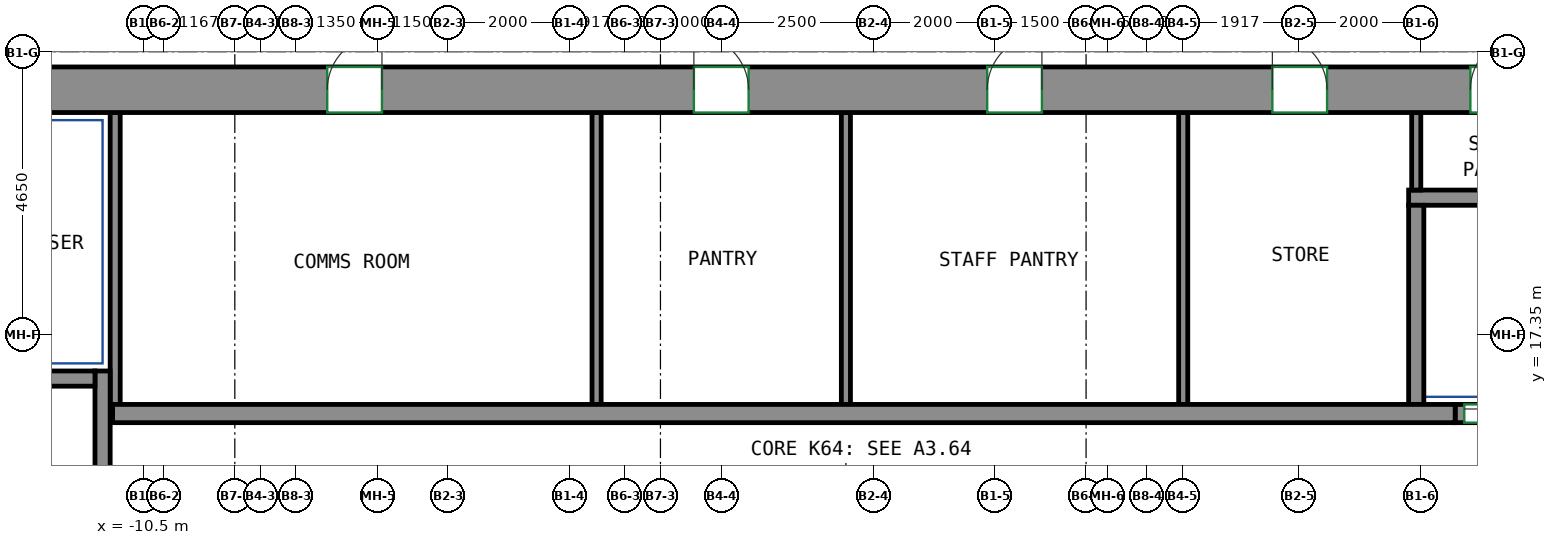
"""IFC4 building model, lengths in metres.
Left out: names, types, materials, properties, quantities, classifications, styles, units other than length and angle.
Written with IfcOpenShell. Run it as: python <this file> out.ifc"""

import sys

from ifc_helpers import new_model, si_unit, direction, frame, frame_2d, origin, place, context, subcontext, project, spatial, rectangle, extrude, source, transform, mapped, element, fill, save


model = new_model("IFC4")
c1 = context("Model", 3, precision=1e-05, world=origin(), true_north=direction((0.0, 1.0)))
c2 = subcontext(c1, "Body", "Model", "MODEL_VIEW")
j1 = project(units=[si_unit("LENGTHUNIT", "METRE"), si_unit("PLANEANGLEUNIT", "RADIAN")], contexts=[c1])
p1 = place(None, origin())
s1 = spatial("IfcSite", under=j1, at=p1, CompositionType="ELEMENT")
p2 = place(p1, origin())
s2 = spatial("IfcBuilding", under=s1, at=p2, CompositionType="ELEMENT")
p3 = place(p2, frame((0.0, 0.0, 259.4)))
s3 = spatial("IfcBuildingStorey", under=s2, at=p3, CompositionType="ELEMENT", Elevation=259.4)
m1 = source(origin(), c2, "Body", "SweptSolid", [
    extrude(rectangle(XDim=33.6, YDim=0.75, at=frame_2d((16.8, 0.0))), origin(), (0.0, 0.0, 1.0), 3.0),
])
p4 = place(p3, frame((-15.75, 21.375, 0.0), z_axis=(0.0, 0.0, 1.0), x_axis=(1.0, 0.0, 0.0)))
e1 = element("IfcWall", 1, at=p4, inside=s3, PredefinedType="SHEAR", context=c2, shape_type="MappedRepresentation", body=[
    mapped(m1, transform((0.0, 0.0, 0.0))),
])
p5 = place(p4, frame((8.27, 0.0, 0.0)))
e2 = element("IfcOpeningElement", 2, at=p5, cuts=e1, PredefinedType="OPENING", context=c2, shape_type="SweptSolid", body=[
    extrude(rectangle(XDim=0.9, YDim=2.1, at=frame_2d((0.45, 1.05))), frame((0.0, 0.385, 0.0), z_axis=(0.0, -1.0, 0.0), x_axis=(1.0, 0.0, 0.0)), (0.0, 0.0, 1.0), 0.77),
])
p6 = place(p4, frame((14.3, 0.0, 0.0)))
e3 = element("IfcOpeningElement", 3, at=p6, cuts=e1, PredefinedType="OPENING", context=c2, shape_type="SweptSolid", body=[
    extrude(rectangle(XDim=0.9, YDim=2.1, at=frame_2d((0.45, 1.05))), frame((0.0, 0.385, 0.0), z_axis=(0.0, -1.0, 0.0), x_axis=(1.0, 0.0, 0.0)), (0.0, 0.0, 1.0), 0.77),
])
p7 = place(p4, frame((19.124, 0.0, 0.0)))
e4 = element("IfcOpeningElement", 4, at=p7, cuts=e1, PredefinedType="OPENING", context=c2, shape_type="SweptSolid", body=[
    extrude(rectangle(XDim=0.9, YDim=2.1, at=frame_2d((0.45, 1.05))), frame((0.0, 0.385, 0.0), z_axis=(0.0, -1.0, 0.0), x_axis=(1.0, 0.0, 0.0)), (0.0, 0.0, 1.0), 0.77),
])
p8 = place(p4, frame((23.814, 0.0, 0.0)))
e5 = element("IfcOpeningElement", 5, at=p8, cuts=e1, PredefinedType="OPENING", context=c2, shape_type="SweptSolid", body=[
    extrude(rectangle(XDim=0.9, YDim=2.1, at=frame_2d((0.45, 1.05))), frame((0.0, 0.385, 0.0), z_axis=(0.0, -1.0, 0.0), x_axis=(1.0, 0.0, 0.0)), (0.0, 0.0, 1.0), 0.77),
])
p9 = place(p4, frame((27.07, 0.0, 0.0)))
e6 = element("IfcOpeningElement", 6, at=p9, cuts=e1, PredefinedType="OPENING", context=c2, shape_type="SweptSolid", body=[
    extrude(rectangle(XDim=0.9, YDim=2.1, at=frame_2d((0.45, 1.05))), frame((0.0, 0.385, 0.0), z_axis=(0.0, -1.0, 0.0), x_axis=(1.0, 0.0, 0.0)), (0.0, 0.0, 1.0), 0.77),
])
p10 = place(p4, frame((2.275, 0.0, 0.0)))
e7 = element("IfcOpeningElement", 7, at=p10, cuts=e1, PredefinedType="OPENING", context=c2, shape_type="SweptSolid", body=[
    extrude(rectangle(XDim=0.9, YDim=2.1, at=frame_2d((0.45, 1.05))), frame((0.0, 0.385, 0.0), z_axis=(0.0, -1.0, 0.0), x_axis=(1.0, 0.0, 0.0)), (0.0, 0.0, 1.0), 0.77),
])
p11 = place(p4, frame((30.425, 0.0, 0.0)))
e8 = element("IfcOpeningElement", 8, at=p11, cuts=e1, PredefinedType="OPENING", context=c2, shape_type="SweptSolid", body=[
    extrude(rectangle(XDim=0.9, YDim=2.1, at=frame_2d((0.45, 1.05))), frame((0.0, 0.385, 0.0), z_axis=(0.0, -1.0, 0.0), x_axis=(1.0, 0.0, 0.0)), (0.0, 0.0, 1.0), 0.77),
])
m2 = source(origin(), c2, "Body", "SweptSolid", [
    extrude(rectangle(XDim=7.75, YDim=0.25, at=frame_2d((3.875, 0.0))), origin(), (0.0, 0.0, 1.0), 3.0),
])
p12 = place(p3, frame((-11.175, 9.0, 0.0), z_axis=(0.0, 0.0, 1.0), x_axis=(0.0, 1.0, 0.0)))
e9 = element("IfcWall", 9, at=p12, inside=s3, PredefinedType="SHEAR", context=c2, shape_type="MappedRepresentation", body=[
    mapped(m2, transform((0.0, 0.0, 0.0))),
])
m3 = source(origin(), c2, "Body", "SweptSolid", [
    extrude(rectangle(XDim=3.7, YDim=0.25, at=frame_2d((1.85, 0.0))), origin(), (0.0, 0.0, 1.0), 3.0),
])
p13 = place(p3, frame((-15.0, 16.625, 0.0), z_axis=(0.0, 0.0, 1.0), x_axis=(1.0, 0.0, 0.0)))
e10 = element("IfcWall", 10, at=p13, inside=s3, PredefinedType="SHEAR", context=c2, shape_type="MappedRepresentation", body=[
    mapped(m3, transform((0.0, 0.0, 0.0))),
])
m4 = source(origin(), c2, "Body", "SweptSolid", [
    extrude(rectangle(XDim=22.08, YDim=0.3, at=frame_2d((11.04, 0.0))), origin(), (0.0, 0.0, 1.0), 3.0),
])
p14 = place(p3, frame((-11.01, 16.05, 0.0), z_axis=(0.0, 0.0, 1.0), x_axis=(1.0, 0.0, 0.0)))
e11 = element("IfcWall", 11, at=p14, inside=s3, PredefinedType="SHEAR", context=c2, shape_type="MappedRepresentation", body=[
    mapped(m4, transform((0.0, 0.0, 0.0))),
])
m5 = source(origin(), c2, "Body", "SweptSolid", [
    extrude(rectangle(XDim=1.4, YDim=0.3, at=frame_2d((0.7, 0.0))), origin(), (0.0, 0.0, 1.0), 3.0),
])
p15 = place(p3, frame((11.07, 16.05, 0.0), z_axis=(0.0, 0.0, 1.0), x_axis=(1.0, 0.0, 0.0)))
e12 = element("IfcWall", 12, at=p15, inside=s3, PredefinedType="PARTITIONING", context=c2, shape_type="MappedRepresentation", body=[
    mapped(m5, transform((0.0, 0.0, 0.0))),
])
p16 = place(p15, frame((0.15, 0.0, 0.0)))
e13 = element("IfcOpeningElement", 13, at=p16, cuts=e12, PredefinedType="OPENING", context=c2, shape_type="SweptSolid", body=[
    extrude(rectangle(XDim=1.1, YDim=2.1, at=frame_2d((0.55, 1.05))), frame((0.0, 0.16, 0.0), z_axis=(0.0, -1.0, 0.0), x_axis=(1.0, 0.0, 0.0)), (0.0, 0.0, 1.0), 0.32),
])
m6 = source(origin(), c2, "Body", "SweptSolid", [
    extrude(rectangle(XDim=2.93, YDim=0.25, at=frame_2d((1.465, 0.0))), origin(), (0.0, 0.0, 1.0), 3.0),
])
p17 = place(p3, frame((10.305, 19.6, 0.0), z_axis=(0.0, 0.0, 1.0), x_axis=(1.0, 0.0, 0.0)))
e14 = element("IfcWall", 14, at=p17, inside=s3, PredefinedType="PARTITIONING", context=c2, shape_type="MappedRepresentation", body=[
    mapped(m6, transform((0.0, 0.0, 0.0))),
])
m7 = source(origin(), c2, "Body", "SweptSolid", [
    extrude(rectangle(XDim=4.8, YDim=0.165, at=frame_2d((2.4, 0.0))), origin(), (0.0, 0.0, 1.0), 3.0),
])
p18 = place(p3, frame((-10.968, 16.2, 0.0), z_axis=(0.0, 0.0, 1.0), x_axis=(0.0, 1.0, 0.0)))
e15 = element("IfcWall", 15, at=p18, inside=s3, PredefinedType="PARTITIONING", context=c2, shape_type="MappedRepresentation", body=[
    mapped(m7, transform((0.0, 0.0, 0.0))),
])
m8 = source(origin(), c2, "Body", "SweptSolid", [
    extrude(rectangle(XDim=3.275, YDim=0.25, at=frame_2d((1.638, 0.0))), origin(), (0.0, 0.0, 1.0), 3.0),
])
p19 = place(p3, frame((10.43, 16.2, 0.0), z_axis=(0.0, 0.0, 1.0), x_axis=(0.0, 1.0, 0.0)))
e16 = element("IfcWall", 16, at=p19, inside=s3, PredefinedType="PARTITIONING", context=c2, shape_type="MappedRepresentation", body=[
    mapped(m8, transform((0.0, 0.0, 0.0))),
])
m9 = source(origin(), c2, "Body", "SweptSolid", [
    extrude(rectangle(XDim=4.8, YDim=0.15, at=frame_2d((2.4, 0.0))), origin(), (0.0, 0.0, 1.0), 3.0),
])
for number, where, z_axis, x_axis in (
    (17, (-3.05, 16.2, 0.0), (0.0, 0.0, 1.0), (0.0, 1.0, 0.0)),
    (18, (1.05, 16.2, 0.0), (0.0, 0.0, 1.0), (0.0, 1.0, 0.0)),
    (19, (6.598, 16.2, 0.0), (0.0, 0.0, 1.0), (0.0, 1.0, 0.0)),
):
    element("IfcWall", number, at=place(p3, frame(where, z_axis=z_axis, x_axis=x_axis)), inside=s3, PredefinedType="PARTITIONING", context=c2, shape_type="MappedRepresentation", body=[
        mapped(m9, transform((0.0, 0.0, 0.0))),
    ])
m10 = source(origin(), c2, "Body", "SweptSolid", [
    extrude(rectangle(XDim=1.275, YDim=0.15, at=frame_2d((0.637, 0.0))), origin(), (0.0, 0.0, 1.0), 3.0),
])
p20 = place(p3, frame((10.43, 19.725, 0.0), z_axis=(0.0, 0.0, 1.0), x_axis=(0.0, 1.0, 0.0)))
e20 = element("IfcWall", 20, at=p20, inside=s3, PredefinedType="PARTITIONING", context=c2, shape_type="MappedRepresentation", body=[
    mapped(m10, transform((0.0, 0.0, 0.0))),
])
p21 = place(p16, origin())
e21 = element("IfcDoor", 21, at=p21, inside=s3, OperationType="DOUBLE_DOOR_SLIDING", PredefinedType="DOOR", context=c2, shape_type="SweptSolid", body=[
    extrude(rectangle(XDim=1.1, YDim=2.1, at=frame_2d((0.55, 1.05))), frame((0.0, 0.025, 0.0), z_axis=(0.0, -1.0, 0.0), x_axis=(1.0, 0.0, 0.0)), (0.0, 0.0, 1.0), 0.05),
])
fill(e13, e21)
p22 = place(p5, origin())
e22 = element("IfcDoor", 22, at=p22, inside=s3, OperationType="SINGLE_SWING_RIGHT", PredefinedType="DOOR", context=c2, shape_type="SweptSolid", body=[
    extrude(rectangle(XDim=0.9, YDim=2.1, at=frame_2d((0.45, 1.05))), frame((0.0, -0.23, 0.0), z_axis=(0.0, -1.0, 0.0), x_axis=(1.0, 0.0, 0.0)), (0.0, 0.0, 1.0), 0.05),
])
fill(e2, e22)
p23 = place(p6, origin())
e23 = element("IfcDoor", 23, at=p23, inside=s3, OperationType="SINGLE_SWING_LEFT", PredefinedType="DOOR", context=c2, shape_type="SweptSolid", body=[
    extrude(rectangle(XDim=0.9, YDim=2.1, at=frame_2d((0.45, 1.05))), frame((0.0, -0.23, 0.0), z_axis=(0.0, -1.0, 0.0), x_axis=(1.0, 0.0, 0.0)), (0.0, 0.0, 1.0), 0.05),
])
fill(e3, e23)
p24 = place(p7, origin())
e24 = element("IfcDoor", 24, at=p24, inside=s3, OperationType="SINGLE_SWING_RIGHT", PredefinedType="DOOR", context=c2, shape_type="SweptSolid", body=[
    extrude(rectangle(XDim=0.9, YDim=2.1, at=frame_2d((0.45, 1.05))), frame((0.0, -0.23, 0.0), z_axis=(0.0, -1.0, 0.0), x_axis=(1.0, 0.0, 0.0)), (0.0, 0.0, 1.0), 0.05),
])
fill(e4, e24)
p25 = place(p8, origin())
e25 = element("IfcDoor", 25, at=p25, inside=s3, OperationType="SINGLE_SWING_LEFT", PredefinedType="DOOR", context=c2, shape_type="SweptSolid", body=[
    extrude(rectangle(XDim=0.9, YDim=2.1, at=frame_2d((0.45, 1.05))), frame((0.0, -0.23, 0.0), z_axis=(0.0, -1.0, 0.0), x_axis=(1.0, 0.0, 0.0)), (0.0, 0.0, 1.0), 0.05),
])
fill(e5, e25)
p26 = place(p9, origin())
e26 = element("IfcDoor", 26, at=p26, inside=s3, OperationType="SINGLE_SWING_RIGHT", PredefinedType="DOOR", context=c2, shape_type="SweptSolid", body=[
    extrude(rectangle(XDim=0.9, YDim=2.1, at=frame_2d((0.45, 1.05))), frame((0.0, -0.23, 0.0), z_axis=(0.0, -1.0, 0.0), x_axis=(1.0, 0.0, 0.0)), (0.0, 0.0, 1.0), 0.05),
])
fill(e6, e26)
save(model, sys.argv[1])
